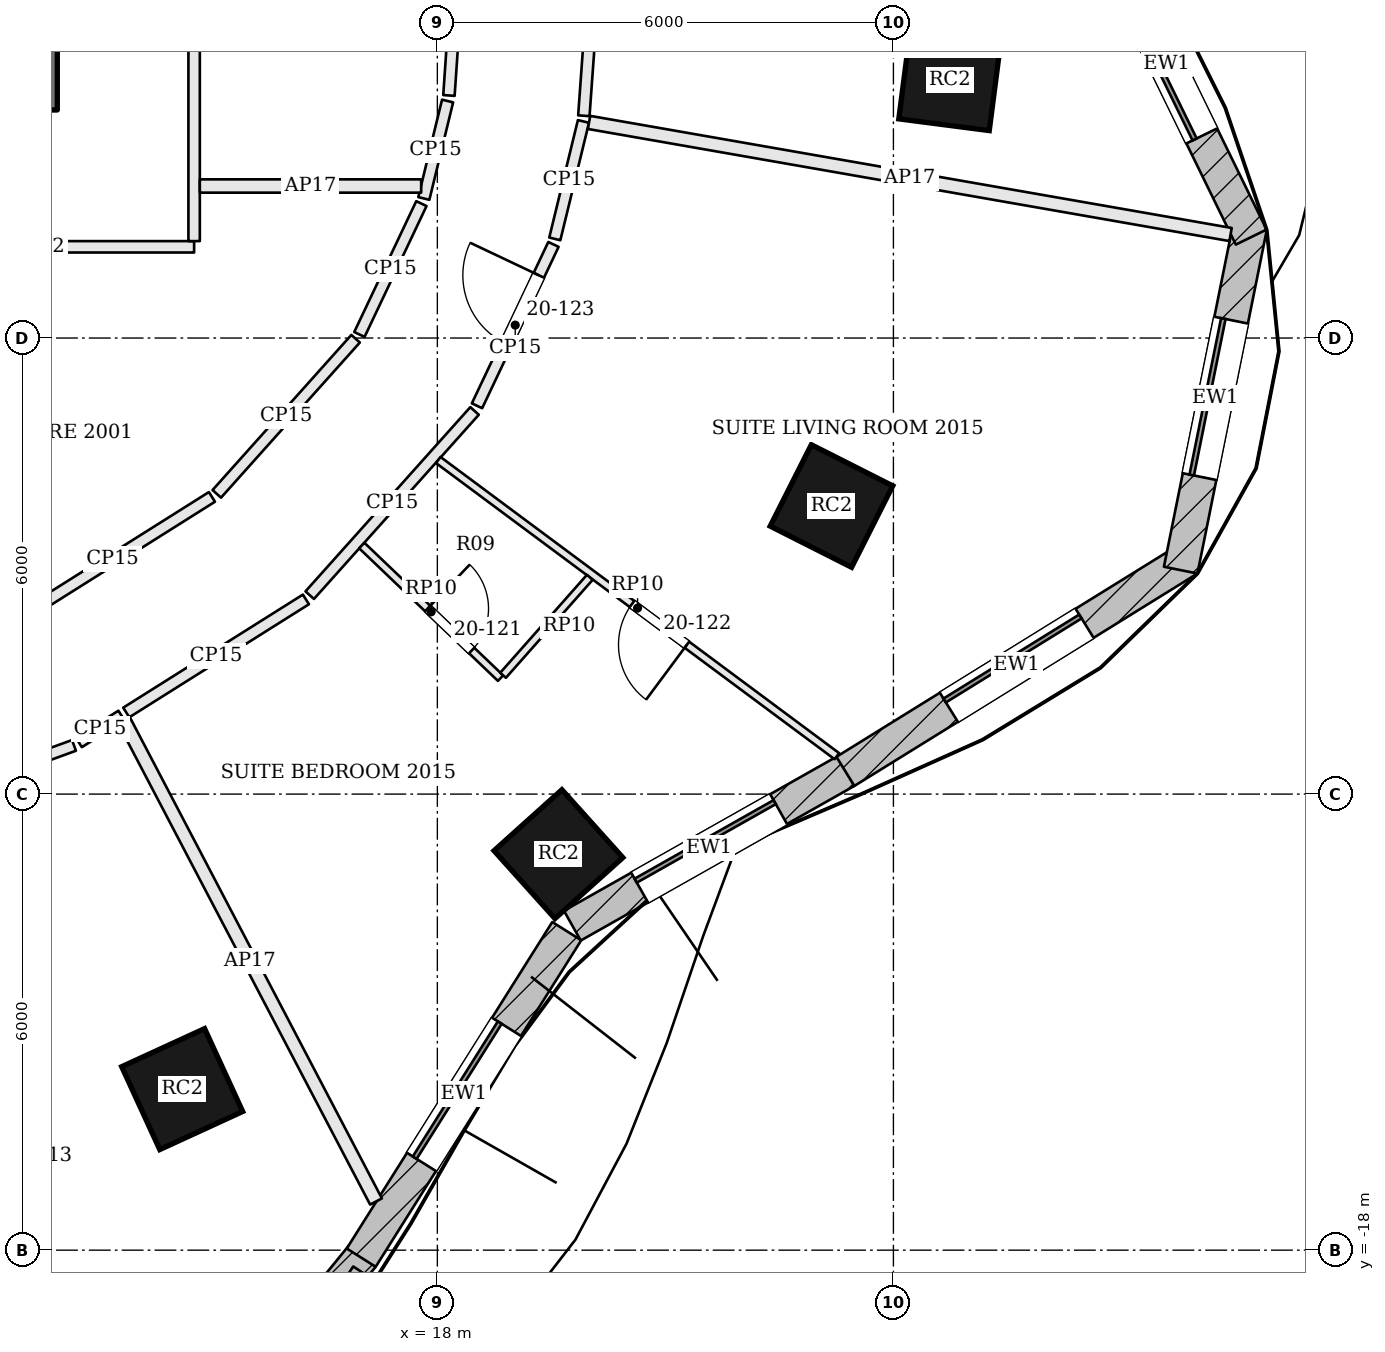
"""IFC4 building model, lengths in metres.
Left out: names, types, materials, properties, quantities, classifications, styles, units other than length and angle.
Written with IfcOpenShell. Run it as: python <this file> out.ifc"""

import sys

from ifc_helpers import new_model, si_unit, direction, frame, frame_2d, origin, origin_2d, place, context, subcontext, project, spatial, rectangle, extrude, element, fill, save


model = new_model("IFC4")
c1 = context("Model", 3, precision=1e-05, world=origin(), true_north=direction((0.0, 1.0)))
c2 = subcontext(c1, "Body", "Model", "MODEL_VIEW")
j1 = project(units=[si_unit("LENGTHUNIT", "METRE"), si_unit("PLANEANGLEUNIT", "RADIAN")], contexts=[c1])
p1 = place(None, origin())
s1 = spatial("IfcSite", under=j1, at=p1, CompositionType="ELEMENT")
p2 = place(p1, origin())
s2 = spatial("IfcBuilding", under=s1, at=p2, CompositionType="ELEMENT")
p3 = place(p2, frame((0.0, 0.0, 88.8)))
s3 = spatial("IfcBuildingStorey", under=s2, at=p3, CompositionType="ELEMENT", Elevation=88.8)
p4 = place(p3, frame((-13.0, -2.45, 0.0), z_axis=(0.0, 0.0, 1.0), x_axis=(1.0, 0.0, 0.0)))
e1 = element("IfcWall", 1, at=p4, inside=s3, PredefinedType="SHEAR", context=c2, shape_type="SweptSolid", body=[
    extrude(rectangle(XDim=26.0, YDim=1.1, at=frame_2d((13.0, 0.0))), origin(), (0.0, 0.0, 1.0), 3.6),
])
p5 = place(p4, frame((9.225, 0.0, 0.0)))
e2 = element("IfcOpeningElement", 2, at=p5, cuts=e1, PredefinedType="OPENING", context=c2, shape_type="SweptSolid", body=[
    extrude(rectangle(XDim=1.0, YDim=2.1, at=frame_2d((0.5, 1.05))), frame((0.0, 0.56, 0.0), z_axis=(0.0, -1.0, 0.0), x_axis=(1.0, 0.0, 0.0)), (0.0, 0.0, 1.0), 1.12),
])
p6 = place(p4, frame((11.825, 0.0, 0.0)))
e3 = element("IfcOpeningElement", 3, at=p6, cuts=e1, PredefinedType="OPENING", context=c2, shape_type="SweptSolid", body=[
    extrude(rectangle(XDim=0.7, YDim=2.1, at=frame_2d((0.35, 1.05))), frame((0.0, 0.56, 0.0), z_axis=(0.0, -1.0, 0.0), x_axis=(1.0, 0.0, 0.0)), (0.0, 0.0, 1.0), 1.12),
])
p7 = place(p4, frame((13.725, 0.0, 0.0)))
e4 = element("IfcOpeningElement", 4, at=p7, cuts=e1, PredefinedType="OPENING", context=c2, shape_type="SweptSolid", body=[
    extrude(rectangle(XDim=1.0, YDim=2.1, at=frame_2d((0.5, 1.05))), frame((0.0, 0.56, 0.0), z_axis=(0.0, -1.0, 0.0), x_axis=(1.0, 0.0, 0.0)), (0.0, 0.0, 1.0), 1.12),
])
p8 = place(p4, frame((16.225, 0.0, 0.0)))
e5 = element("IfcOpeningElement", 5, at=p8, cuts=e1, PredefinedType="OPENING", context=c2, shape_type="SweptSolid", body=[
    extrude(rectangle(XDim=0.9, YDim=2.1, at=frame_2d((0.45, 1.05))), frame((0.0, 0.56, 0.0), z_axis=(0.0, -1.0, 0.0), x_axis=(1.0, 0.0, 0.0)), (0.0, 0.0, 1.0), 1.12),
])
for number, where, z_axis, x_axis in (
    (6, (14.643, -15.881, 0.0), (0.0, 0.0, 1.0), (0.909, 0.417, 0.0)),
    (7, (19.593, -12.79, 0.0), (0.0, 0.0, 1.0), (0.744, 0.668, 0.0)),
    (8, (23.185, -8.21, 0.0), (0.0, 0.0, 1.0), (0.451, 0.893, 0.0)),
    (9, (24.743, -2.599, 0.0), (0.0, 0.0, 1.0), (0.128, 0.992, 0.0)),
):
    element("IfcColumn", number, at=place(p3, frame(where, z_axis=z_axis, x_axis=x_axis)), inside=s3, PredefinedType="COLUMN", context=c2, shape_type="SweptSolid", body=[
        extrude(rectangle(XDim=1.2, YDim=1.2, at=origin_2d()), origin(), (0.0, 0.0, 1.0), 3.6),
    ])
p9 = place(p3, frame((14.926, -20.641, 0.0), z_axis=(0.0, 0.0, 1.0), x_axis=(0.631548074669, 0.775336720001, 0.0)))
e10 = element("IfcWall", 10, at=p9, inside=s3, PredefinedType="SOLIDWALL", context=c2, shape_type="SweptSolid", body=[
    extrude(rectangle(XDim=3.308, YDim=0.45, at=frame_2d((1.654, 0.0))), origin(), (0.0, 0.0, 1.0), 3.4),
])
p10 = place(p9, frame((0.604, 0.0, 0.9)))
e11 = element("IfcOpeningElement", 11, at=p10, cuts=e10, PredefinedType="OPENING", context=c2, shape_type="SweptSolid", body=[
    extrude(rectangle(XDim=2.1, YDim=2.0, at=frame_2d((1.05, 1.0))), frame((0.0, 0.235, 0.0), z_axis=(0.0, -1.0, 0.0), x_axis=(1.0, 0.0, 0.0)), (0.0, 0.0, 1.0), 0.47),
])
p11 = place(p3, frame((16.998, -18.099, 0.0), z_axis=(0.0, 0.0, 1.0), x_axis=(0.532745661304, 0.846275404559, 0.0)))
e12 = element("IfcWall", 12, at=p11, inside=s3, PredefinedType="SOLIDWALL", context=c2, shape_type="SweptSolid", body=[
    extrude(rectangle(XDim=5.076, YDim=0.45, at=frame_2d((2.538, 0.0))), origin(), (0.0, 0.0, 1.0), 3.4),
])
p12 = place(p11, frame((1.488, 0.0, 0.9)))
e13 = element("IfcOpeningElement", 13, at=p12, cuts=e12, PredefinedType="OPENING", context=c2, shape_type="SweptSolid", body=[
    extrude(rectangle(XDim=2.1, YDim=2.0, at=frame_2d((1.05, 1.0))), frame((0.0, 0.235, 0.0), z_axis=(0.0, -1.0, 0.0), x_axis=(1.0, 0.0, 0.0)), (0.0, 0.0, 1.0), 0.47),
])
p13 = place(p3, frame((19.776, -13.731, 0.0), z_axis=(0.0, 0.0, 1.0), x_axis=(0.870610133829, 0.491973571318, 0.0)))
e14 = element("IfcWall", 14, at=p13, inside=s3, PredefinedType="SOLIDWALL", context=c2, shape_type="SweptSolid", body=[
    extrude(rectangle(XDim=4.134, YDim=0.45, at=frame_2d((2.067, 0.0))), origin(), (0.0, 0.0, 1.0), 3.4),
])
p14 = place(p13, frame((1.017, 0.0, 0.9)))
e15 = element("IfcOpeningElement", 15, at=p14, cuts=e14, PredefinedType="OPENING", context=c2, shape_type="SweptSolid", body=[
    extrude(rectangle(XDim=2.1, YDim=2.0, at=frame_2d((1.05, 1.0))), frame((0.0, 0.235, 0.0), z_axis=(0.0, -1.0, 0.0), x_axis=(1.0, 0.0, 0.0)), (0.0, 0.0, 1.0), 0.47),
])
p15 = place(p3, frame((23.368, -11.701, 0.0), z_axis=(0.0, 0.0, 1.0), x_axis=(0.850251408633, 0.526376806211, 0.0)))
e16 = element("IfcWall", 16, at=p15, inside=s3, PredefinedType="SOLIDWALL", context=c2, shape_type="SweptSolid", body=[
    extrude(rectangle(XDim=5.302, YDim=0.45, at=frame_2d((2.651, 0.0))), origin(), (0.0, 0.0, 1.0), 3.4),
])
p16 = place(p15, frame((1.601, 0.0, 0.9)))
e17 = element("IfcOpeningElement", 17, at=p16, cuts=e16, PredefinedType="OPENING", context=c2, shape_type="SweptSolid", body=[
    extrude(rectangle(XDim=2.1, YDim=2.0, at=frame_2d((1.05, 1.0))), frame((0.0, 0.235, 0.0), z_axis=(0.0, -1.0, 0.0), x_axis=(1.0, 0.0, 0.0)), (0.0, 0.0, 1.0), 0.47),
])
p17 = place(p3, frame((27.78, -9.053, 0.0), z_axis=(0.0, 0.0, 1.0), x_axis=(0.197796229105, 0.980243159503, 0.0)))
e18 = element("IfcWall", 18, at=p17, inside=s3, PredefinedType="SOLIDWALL", context=c2, shape_type="SweptSolid", body=[
    extrude(rectangle(XDim=4.61, YDim=0.45, at=frame_2d((2.305, 0.0))), origin(), (0.0, 0.0, 1.0), 3.4),
])
p18 = place(p17, frame((1.255, 0.0, 0.9)))
e19 = element("IfcOpeningElement", 19, at=p18, cuts=e18, PredefinedType="OPENING", context=c2, shape_type="SweptSolid", body=[
    extrude(rectangle(XDim=2.1, YDim=2.0, at=frame_2d((1.05, 1.0))), frame((0.0, 0.235, 0.0), z_axis=(0.0, -1.0, 0.0), x_axis=(1.0, 0.0, 0.0)), (0.0, 0.0, 1.0), 0.47),
])
p19 = place(p3, frame((28.707, -4.672, 0.0), z_axis=(0.0, 0.0, 1.0), x_axis=(-0.439053549989, 0.898460895221, 0.0)))
e20 = element("IfcWall", 20, at=p19, inside=s3, PredefinedType="SOLIDWALL", context=c2, shape_type="SweptSolid", body=[
    extrude(rectangle(XDim=5.062, YDim=0.45, at=frame_2d((2.531, 0.0))), origin(), (0.0, 0.0, 1.0), 3.4),
])
p20 = place(p19, frame((1.481, 0.0, 0.9)))
e21 = element("IfcOpeningElement", 21, at=p20, cuts=e20, PredefinedType="OPENING", context=c2, shape_type="SweptSolid", body=[
    extrude(rectangle(XDim=2.1, YDim=2.0, at=frame_2d((1.05, 1.0))), frame((0.0, 0.235, 0.0), z_axis=(0.0, -1.0, 0.0), x_axis=(1.0, 0.0, 0.0)), (0.0, 0.0, 1.0), 0.47),
])
p21 = place(p3, frame((16.838, -18.298, 0.0), z_axis=(0.0, 0.0, 1.0), x_axis=(0.835871900419, -0.548924554097, 0.0)))
e22 = element("IfcWall", 22, at=p21, inside=s3, PredefinedType="SOLIDWALL", context=c2, shape_type="SweptSolid", body=[
    extrude(rectangle(XDim=1.75, YDim=0.2, at=frame_2d((0.875, 0.0))), origin(), (0.0, 0.0, 1.0), 3.4),
])
p22 = place(p3, frame((9.728, -12.631, 0.0), z_axis=(0.0, 0.0, 1.0), x_axis=(0.939626438181, 0.342201923826, 0.0)))
e23 = element("IfcWall", 23, at=p22, inside=s3, PredefinedType="PARTITIONING", context=c2, shape_type="SweptSolid", body=[
    extrude(rectangle(XDim=3.716, YDim=0.15, at=frame_2d((1.858, 0.0))), origin(), (0.0, 0.0, 1.0), 2.784),
])
p23 = place(p22, frame((0.45, 0.0, 0.0)))
e24 = element("IfcOpeningElement", 24, at=p23, cuts=e23, PredefinedType="OPENING", context=c2, shape_type="SweptSolid", body=[
    extrude(rectangle(XDim=1.0, YDim=2.1, at=frame_2d((0.5, 1.05))), frame((0.0, 0.085, 0.0), z_axis=(0.0, -1.0, 0.0), x_axis=(1.0, 0.0, 0.0)), (0.0, 0.0, 1.0), 0.17),
])
p24 = place(p3, frame((13.283, -11.319, 0.0), z_axis=(0.0, 0.0, 1.0), x_axis=(0.846275904875, 0.532744866543, 0.0)))
e25 = element("IfcWall", 25, at=p24, inside=s3, PredefinedType="PARTITIONING", context=c2, shape_type="SweptSolid", body=[
    extrude(rectangle(XDim=0.663, YDim=0.15, at=frame_2d((0.331, 0.0))), origin(), (0.0, 0.0, 1.0), 2.784),
])
p25 = place(p3, frame((17.193, -17.36, 0.0), z_axis=(0.0, 0.0, 1.0), x_axis=(-0.464005717448, 0.8858322043, 0.0)))
e26 = element("IfcWall", 26, at=p25, inside=s3, PredefinedType="PARTITIONING", context=c2, shape_type="SweptSolid", body=[
    extrude(rectangle(XDim=7.143, YDim=0.175, at=frame_2d((3.571, 0.0))), origin(), (0.0, 0.0, 1.0), 2.784),
])
p26 = place(p3, frame((13.907, -10.927, 0.0), z_axis=(0.0, 0.0, 1.0), x_axis=(0.846289768331, 0.53272284353, 0.0)))
e27 = element("IfcWall", 27, at=p26, inside=s3, PredefinedType="PARTITIONING", context=c2, shape_type="SweptSolid", body=[
    extrude(rectangle(XDim=2.793, YDim=0.15, at=frame_2d((1.396, 0.0))), origin(), (0.0, 0.0, 1.0), 2.784),
])
p27 = place(p3, frame((16.321, -9.383, 0.0), z_axis=(0.0, 0.0, 1.0), x_axis=(0.666834356165, 0.745205972492, 0.0)))
e28 = element("IfcWall", 28, at=p27, inside=s3, PredefinedType="PARTITIONING", context=c2, shape_type="SweptSolid", body=[
    extrude(rectangle(XDim=3.252, YDim=0.15, at=frame_2d((1.626, 0.0))), origin(), (0.0, 0.0, 1.0), 2.784),
])
p28 = place(p3, frame((18.522, -6.891, 0.0), z_axis=(0.0, 0.0, 1.0), x_axis=(0.428157819028, 0.903703979191, 0.0)))
e29 = element("IfcWall", 29, at=p28, inside=s3, PredefinedType="PARTITIONING", context=c2, shape_type="SweptSolid", body=[
    extrude(rectangle(XDim=2.349, YDim=0.15, at=frame_2d((1.175, 0.0))), origin(), (0.0, 0.0, 1.0), 2.784),
])
p29 = place(p28, frame((0.9, 0.0, 0.0)))
e30 = element("IfcOpeningElement", 30, at=p29, cuts=e29, PredefinedType="OPENING", context=c2, shape_type="SweptSolid", body=[
    extrude(rectangle(XDim=1.0, YDim=2.1, at=frame_2d((0.5, 1.05))), frame((0.0, 0.085, 0.0), z_axis=(0.0, -1.0, 0.0), x_axis=(1.0, 0.0, 0.0)), (0.0, 0.0, 1.0), 0.17),
])
p30 = place(p3, frame((19.545, -4.696, 0.0), z_axis=(0.0, 0.0, 1.0), x_axis=(0.236715862945, 0.971578921257, 0.0)))
e31 = element("IfcWall", 31, at=p30, inside=s3, PredefinedType="PARTITIONING", context=c2, shape_type="SweptSolid", body=[
    extrude(rectangle(XDim=1.59, YDim=0.15, at=frame_2d((0.795, 0.0))), origin(), (0.0, 0.0, 1.0), 2.784),
])
p31 = place(p3, frame((28.436, -4.638, 0.0), z_axis=(0.0, 0.0, 1.0), x_axis=(-0.985072773891, 0.172138404023, 0.0)))
e32 = element("IfcWall", 32, at=p31, inside=s3, PredefinedType="PARTITIONING", context=c2, shape_type="SweptSolid", body=[
    extrude(rectangle(XDim=8.568, YDim=0.175, at=frame_2d((4.284, 0.0))), origin(), (0.0, 0.0, 1.0), 2.784),
])
p32 = place(p3, frame((19.927, -3.076, 0.0), z_axis=(0.0, 0.0, 1.0), x_axis=(0.071888451482, 0.997412678155, 0.0)))
e33 = element("IfcWall", 33, at=p32, inside=s3, PredefinedType="PARTITIONING", context=c2, shape_type="SweptSolid", body=[
    extrude(rectangle(XDim=3.084, YDim=0.15, at=frame_2d((1.542, 0.0))), origin(), (0.0, 0.0, 1.0), 2.784),
])
p33 = place(p3, frame((18.34, -0.075, 0.0), z_axis=(0.0, 0.0, 1.0), x_axis=(-0.068328193832, -0.997662897941, 0.0)))
e34 = element("IfcWall", 34, at=p33, inside=s3, PredefinedType="PARTITIONING", context=c2, shape_type="SweptSolid", body=[
    extrude(rectangle(XDim=2.74, YDim=0.15, at=frame_2d((1.37, 0.0))), origin(), (0.0, 0.0, 1.0), 2.784),
])
p34 = place(p3, frame((18.135, -2.882, 0.0), z_axis=(0.0, 0.0, 1.0), x_axis=(-0.236653741324, -0.971594054489, 0.0)))
e35 = element("IfcWall", 35, at=p34, inside=s3, PredefinedType="PARTITIONING", context=c2, shape_type="SweptSolid", body=[
    extrude(rectangle(XDim=1.32, YDim=0.15, at=frame_2d((0.66, 0.0))), origin(), (0.0, 0.0, 1.0), 2.784),
])
p35 = place(p3, frame((17.79, -4.231, 0.0), z_axis=(0.0, 0.0, 1.0), x_axis=(-0.428042272357, -0.90375871397, 0.0)))
e36 = element("IfcWall", 36, at=p35, inside=s3, PredefinedType="PARTITIONING", context=c2, shape_type="SweptSolid", body=[
    extrude(rectangle(XDim=1.905, YDim=0.15, at=frame_2d((0.953, 0.0))), origin(), (0.0, 0.0, 1.0), 2.784),
])
p36 = place(p3, frame((16.925, -6.009, 0.0), z_axis=(0.0, 0.0, 1.0), x_axis=(-0.666893859891, -0.745152722359, 0.0)))
e37 = element("IfcWall", 37, at=p36, inside=s3, PredefinedType="PARTITIONING", context=c2, shape_type="SweptSolid", body=[
    extrude(rectangle(XDim=2.739, YDim=0.15, at=frame_2d((1.37, 0.0))), origin(), (0.0, 0.0, 1.0), 2.784),
])
p37 = place(p3, frame((15.034, -8.09, 0.0), z_axis=(0.0, 0.0, 1.0), x_axis=(-0.846322679414, -0.532670557014, 0.0)))
e38 = element("IfcWall", 38, at=p37, inside=s3, PredefinedType="PARTITIONING", context=c2, shape_type="SweptSolid", body=[
    extrude(rectangle(XDim=3.085, YDim=0.15, at=frame_2d((1.543, 0.0))), origin(), (0.0, 0.0, 1.0), 2.784),
])
p38 = place(p3, frame((-14.725, -4.8, 0.0), z_axis=(0.0, 0.0, 1.0), x_axis=(1.0, 0.0, 0.0)))
e39 = element("IfcWall", 39, at=p38, inside=s3, PredefinedType="PARTITIONING", context=c2, shape_type="SweptSolid", body=[
    extrude(rectangle(XDim=29.525, YDim=0.15, at=frame_2d((14.763, 0.0))), origin(), (0.0, 0.0, 1.0), 2.784),
])
p39 = place(p38, frame((2.075, 0.0, 0.0)))
e40 = element("IfcOpeningElement", 40, at=p39, cuts=e39, PredefinedType="OPENING", context=c2, shape_type="SweptSolid", body=[
    extrude(rectangle(XDim=1.0, YDim=2.1, at=frame_2d((0.5, 1.05))), frame((0.0, 0.085, 0.0), z_axis=(0.0, -1.0, 0.0), x_axis=(1.0, 0.0, 0.0)), (0.0, 0.0, 1.0), 0.17),
])
p40 = place(p38, frame((13.825, 0.0, 0.0)))
e41 = element("IfcOpeningElement", 41, at=p40, cuts=e39, PredefinedType="OPENING", context=c2, shape_type="SweptSolid", body=[
    extrude(rectangle(XDim=1.8, YDim=2.1, at=frame_2d((0.9, 1.05))), frame((0.0, 0.085, 0.0), z_axis=(0.0, -1.0, 0.0), x_axis=(1.0, 0.0, 0.0)), (0.0, 0.0, 1.0), 0.17),
])
p41 = place(p38, frame((26.525, 0.0, 0.0)))
e42 = element("IfcOpeningElement", 42, at=p41, cuts=e39, PredefinedType="OPENING", context=c2, shape_type="SweptSolid", body=[
    extrude(rectangle(XDim=0.7, YDim=2.1, at=frame_2d((0.35, 1.05))), frame((0.0, 0.085, 0.0), z_axis=(0.0, -1.0, 0.0), x_axis=(1.0, 0.0, 0.0)), (0.0, 0.0, 1.0), 0.17),
])
p42 = place(p3, frame((14.8, -4.725, 0.0), z_axis=(0.0, 0.0, 1.0), x_axis=(0.0, 1.0, 0.0)))
e43 = element("IfcWall", 43, at=p42, inside=s3, PredefinedType="PARTITIONING", context=c2, shape_type="SweptSolid", body=[
    extrude(rectangle(XDim=12.948, YDim=0.15, at=frame_2d((6.474, 0.0))), origin(), (0.0, 0.0, 1.0), 2.784),
])
p43 = place(p42, frame((6.336, 0.0, 0.0)))
e44 = element("IfcOpeningElement", 44, at=p43, cuts=e43, PredefinedType="OPENING", context=c2, shape_type="SweptSolid", body=[
    extrude(rectangle(XDim=1.0, YDim=2.1, at=frame_2d((0.5, 1.05))), frame((0.0, 0.085, 0.0), z_axis=(0.0, -1.0, 0.0), x_axis=(1.0, 0.0, 0.0)), (0.0, 0.0, 1.0), 0.17),
])
p44 = place(p3, frame((23.256, -11.501, 0.0), z_axis=(0.0, 0.0, 1.0), x_axis=(-0.802700401869, 0.596382482003, 0.0)))
e45 = element("IfcWall", 45, at=p44, inside=s3, PredefinedType="PARTITIONING", context=c2, shape_type="SweptSolid", body=[
    extrude(rectangle(XDim=6.533, YDim=0.1, at=frame_2d((3.267, 0.0))), origin(), (0.0, 0.0, 1.0), 2.884),
])
p45 = place(p44, frame((2.458, 0.0, 0.0)))
e46 = element("IfcOpeningElement", 46, at=p45, cuts=e45, PredefinedType="OPENING", context=c2, shape_type="SweptSolid", body=[
    extrude(rectangle(XDim=0.9, YDim=2.4, at=frame_2d((0.45, 1.2))), frame((0.0, 0.06, 0.0), z_axis=(0.0, -1.0, 0.0), x_axis=(1.0, 0.0, 0.0)), (0.0, 0.0, 1.0), 0.12),
])
p46 = place(p3, frame((17.006, -8.73, 0.0), z_axis=(0.0, 0.0, 1.0), x_axis=(0.722927369978, -0.690924031813, 0.0)))
e47 = element("IfcWall", 47, at=p46, inside=s3, PredefinedType="PARTITIONING", context=c2, shape_type="SweptSolid", body=[
    extrude(rectangle(XDim=2.525, YDim=0.1, at=frame_2d((1.263, 0.0))), origin(), (0.0, 0.0, 1.0), 2.884),
])
p47 = place(p46, frame((1.2, 0.0, 0.0)))
e48 = element("IfcOpeningElement", 48, at=p47, cuts=e47, PredefinedType="OPENING", context=c2, shape_type="SweptSolid", body=[
    extrude(rectangle(XDim=0.8, YDim=2.1, at=frame_2d((0.4, 1.05))), frame((0.0, 0.06, 0.0), z_axis=(0.0, -1.0, 0.0), x_axis=(1.0, 0.0, 0.0)), (0.0, 0.0, 1.0), 0.12),
])
p48 = place(p3, frame((18.865, -10.437, 0.0), z_axis=(0.0, 0.0, 1.0), x_axis=(0.662901257744, 0.748706833468, 0.0)))
e49 = element("IfcWall", 49, at=p48, inside=s3, PredefinedType="PARTITIONING", context=c2, shape_type="SweptSolid", body=[
    extrude(rectangle(XDim=1.721, YDim=0.1, at=frame_2d((0.861, 0.0))), origin(), (0.0, 0.0, 1.0), 2.884),
])
p49 = place(p3, frame((14.875, -4.0, 0.0), z_axis=(0.0, 0.0, 1.0), x_axis=(1.0, 0.0, 0.0)))
e50 = element("IfcWall", 50, at=p49, inside=s3, PredefinedType="PARTITIONING", context=c2, shape_type="SweptSolid", body=[
    extrude(rectangle(XDim=2.912, YDim=0.175, at=frame_2d((1.456, 0.0))), origin(), (0.0, 0.0, 1.0), 2.784),
])
p50 = place(p12, origin())
e51 = element("IfcWindow", 51, at=p50, inside=s3, PartitioningType="SINGLE_PANEL", PredefinedType="WINDOW", context=c2, shape_type="SweptSolid", body=[
    extrude(rectangle(XDim=2.1, YDim=2.0, at=frame_2d((1.05, 1.0))), frame((0.0, 0.135, 0.0), z_axis=(0.0, -1.0, 0.0), x_axis=(1.0, 0.0, 0.0)), (0.0, 0.0, 1.0), 0.06),
])
fill(e13, e51)
p51 = place(p14, origin())
e52 = element("IfcWindow", 52, at=p51, inside=s3, PartitioningType="SINGLE_PANEL", PredefinedType="WINDOW", context=c2, shape_type="SweptSolid", body=[
    extrude(rectangle(XDim=2.1, YDim=2.0, at=frame_2d((1.05, 1.0))), frame((0.0, 0.135, 0.0), z_axis=(0.0, -1.0, 0.0), x_axis=(1.0, 0.0, 0.0)), (0.0, 0.0, 1.0), 0.06),
])
fill(e15, e52)
p52 = place(p16, origin())
e53 = element("IfcWindow", 53, at=p52, inside=s3, PartitioningType="SINGLE_PANEL", PredefinedType="WINDOW", context=c2, shape_type="SweptSolid", body=[
    extrude(rectangle(XDim=2.1, YDim=2.0, at=frame_2d((1.05, 1.0))), frame((0.0, 0.135, 0.0), z_axis=(0.0, -1.0, 0.0), x_axis=(1.0, 0.0, 0.0)), (0.0, 0.0, 1.0), 0.06),
])
fill(e17, e53)
p53 = place(p18, origin())
e54 = element("IfcWindow", 54, at=p53, inside=s3, PartitioningType="SINGLE_PANEL", PredefinedType="WINDOW", context=c2, shape_type="SweptSolid", body=[
    extrude(rectangle(XDim=2.1, YDim=2.0, at=frame_2d((1.05, 1.0))), frame((0.0, 0.135, 0.0), z_axis=(0.0, -1.0, 0.0), x_axis=(1.0, 0.0, 0.0)), (0.0, 0.0, 1.0), 0.06),
])
fill(e19, e54)
p54 = place(p20, origin())
e55 = element("IfcWindow", 55, at=p54, inside=s3, PartitioningType="SINGLE_PANEL", PredefinedType="WINDOW", context=c2, shape_type="SweptSolid", body=[
    extrude(rectangle(XDim=2.1, YDim=2.0, at=frame_2d((1.05, 1.0))), frame((0.0, 0.135, 0.0), z_axis=(0.0, -1.0, 0.0), x_axis=(1.0, 0.0, 0.0)), (0.0, 0.0, 1.0), 0.06),
])
fill(e21, e55)
p55 = place(p47, origin())
e56 = element("IfcDoor", 56, at=p55, inside=s3, OperationType="SINGLE_SWING_LEFT", PredefinedType="DOOR", context=c2, shape_type="SweptSolid", body=[
    extrude(rectangle(XDim=0.8, YDim=2.1, at=frame_2d((0.4, 1.05))), frame((0.0, 0.025, 0.0), z_axis=(0.0, -1.0, 0.0), x_axis=(1.0, 0.0, 0.0)), (0.0, 0.0, 1.0), 0.05),
])
fill(e48, e56)
p56 = place(p45, origin())
e57 = element("IfcDoor", 57, at=p56, inside=s3, OperationType="SINGLE_SWING_LEFT", PredefinedType="DOOR", context=c2, shape_type="SweptSolid", body=[
    extrude(rectangle(XDim=0.9, YDim=2.4, at=frame_2d((0.45, 1.2))), frame((0.0, 0.025, 0.0), z_axis=(0.0, -1.0, 0.0), x_axis=(1.0, 0.0, 0.0)), (0.0, 0.0, 1.0), 0.05),
])
fill(e46, e57)
p57 = place(p29, origin())
e58 = element("IfcDoor", 58, at=p57, inside=s3, OperationType="SINGLE_SWING_RIGHT", PredefinedType="DOOR", context=c2, shape_type="SweptSolid", body=[
    extrude(rectangle(XDim=1.0, YDim=2.1, at=frame_2d((0.5, 1.05))), frame((0.0, 0.025, 0.0), z_axis=(0.0, -1.0, 0.0), x_axis=(1.0, 0.0, 0.0)), (0.0, 0.0, 1.0), 0.05),
])
fill(e30, e58)
save(model, sys.argv[1])
